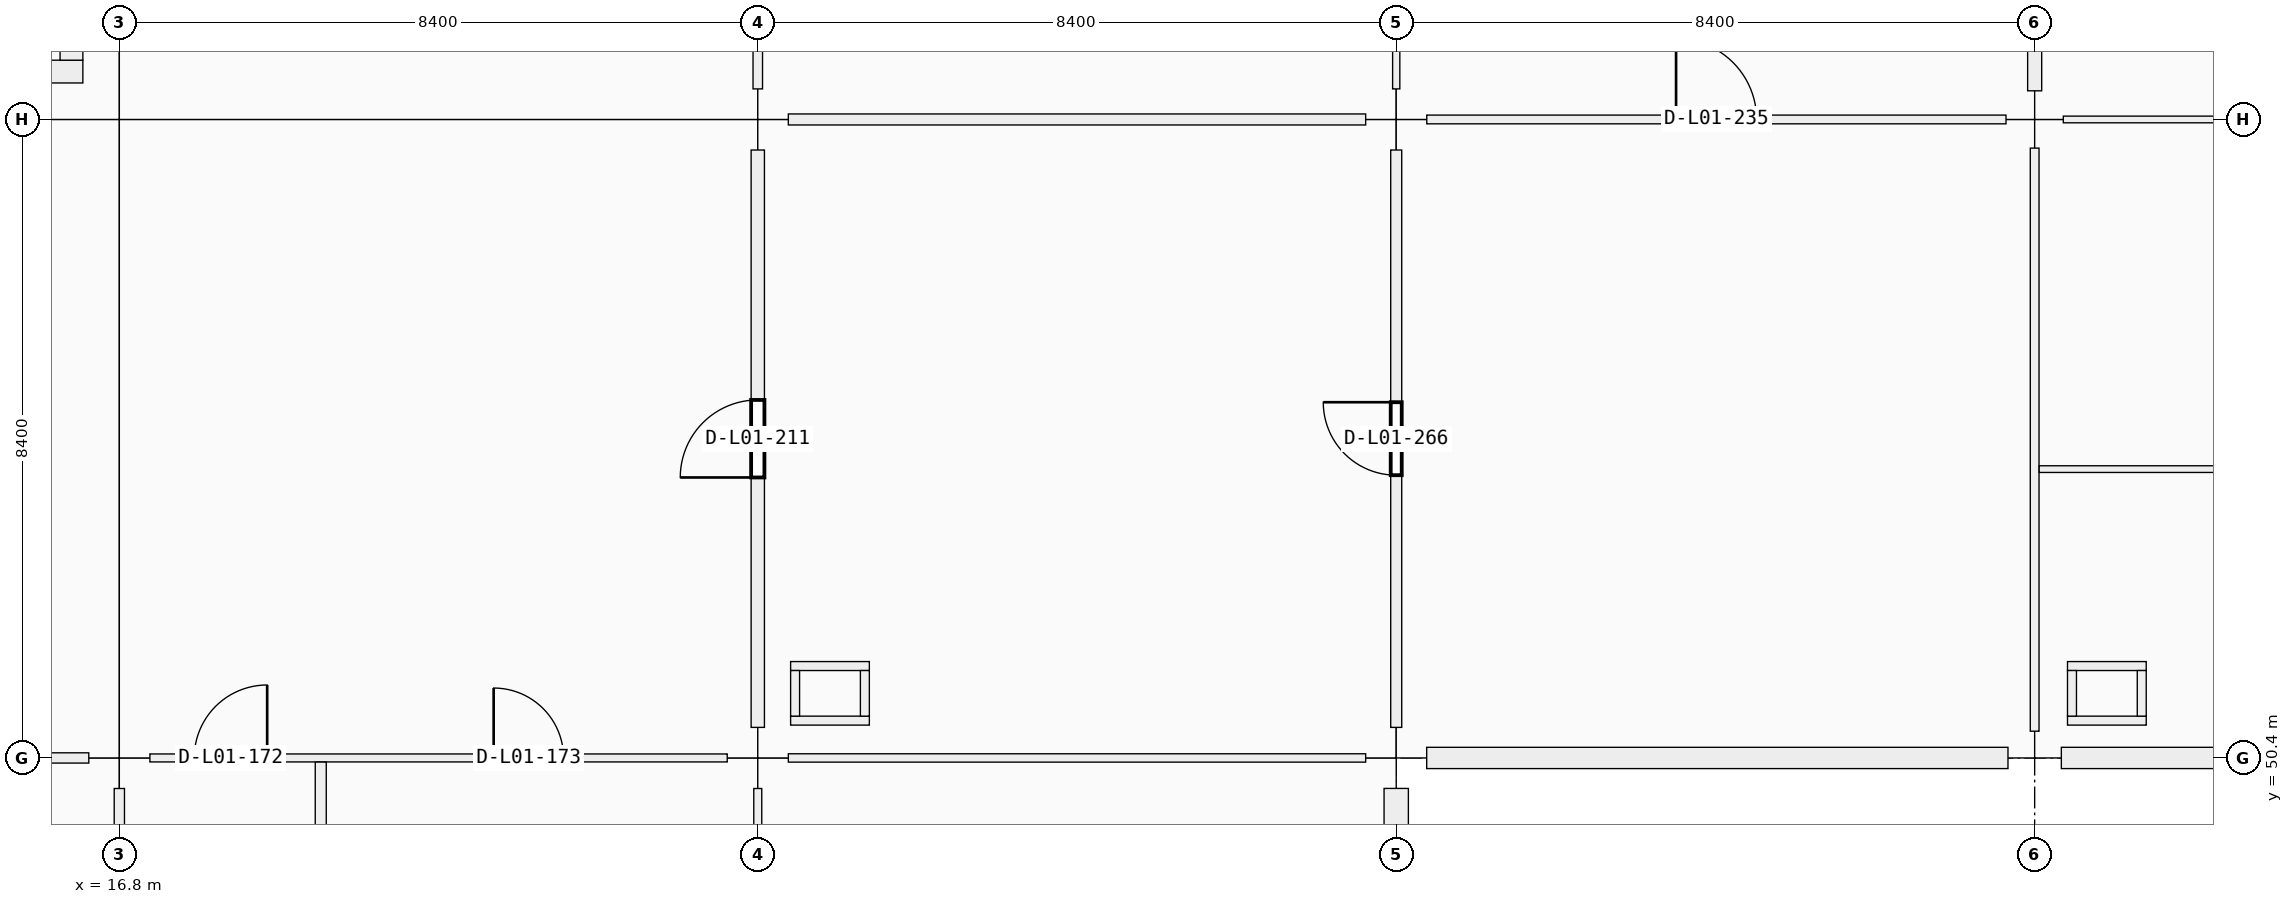
"""IFC4 building model, lengths in metres.
Left out: names, types, materials, properties, quantities, classifications, styles, units other than length and angle.
Written with IfcOpenShell. Run it as: python <this file> out.ifc"""

import sys

from ifc_helpers import new_model, si_unit, direction, frame, frame_2d, origin, origin_2d, place, context, subcontext, project, spatial, rectangle, extrude, element, fill, save


model = new_model("IFC4")
c1 = context("Model", 3, precision=1e-05, world=origin(), true_north=direction((0.0, 1.0)))
c2 = subcontext(c1, "Body", "Model", "MODEL_VIEW")
j1 = project(units=[si_unit("LENGTHUNIT", "METRE"), si_unit("PLANEANGLEUNIT", "RADIAN")], contexts=[c1])
p1 = place(None, origin())
s1 = spatial("IfcSite", under=j1, at=p1, CompositionType="ELEMENT")
p2 = place(p1, origin())
s2 = spatial("IfcBuilding", under=s1, at=p2, CompositionType="ELEMENT")
p3 = place(p2, frame((0.0, 0.0, 5.76)))
s3 = spatial("IfcBuildingStorey", under=s2, at=p3, CompositionType="ELEMENT", Elevation=5.76)
for number, where, z_axis, x_axis in (
    (1, (16.8, 50.4, 0.0), (0.0, 0.0, 1.0), (1.0, 0.0, 0.0)),
    (2, (16.8, 58.8, 0.0), (0.0, 0.0, 1.0), (1.0, 0.0, 0.0)),
    (3, (25.2, 50.4, 0.0), (0.0, 0.0, 1.0), (1.0, 0.0, 0.0)),
    (4, (25.2, 58.8, 0.0), (0.0, 0.0, 1.0), (1.0, 0.0, 0.0)),
    (5, (33.6, 50.4, 0.0), (0.0, 0.0, 1.0), (1.0, 0.0, 0.0)),
    (6, (33.6, 58.8, 0.0), (0.0, 0.0, 1.0), (1.0, 0.0, 0.0)),
):
    element("IfcColumn", number, at=place(p3, frame(where, z_axis=z_axis, x_axis=x_axis)), inside=s3, PredefinedType="COLUMN", context=c2, shape_type="SweptSolid", body=[
        extrude(rectangle(XDim=0.8, YDim=0.8, at=origin_2d()), origin(), (0.0, 0.0, 1.0), 4.5),
    ])
p4 = place(p3, frame((42.0, 50.4, 0.0), z_axis=(0.0, 0.0, 1.0), x_axis=(1.0, 0.0, 0.0)))
e7 = element("IfcColumn", 7, at=p4, inside=s3, PredefinedType="COLUMN", context=c2, shape_type="SweptSolid", body=[
    extrude(rectangle(XDim=0.7, YDim=0.7, at=origin_2d()), origin(), (0.0, 0.0, 1.0), 4.5),
])
p5 = place(p3, frame((42.0, 58.8, 0.0), z_axis=(0.0, 0.0, 1.0), x_axis=(1.0, 0.0, 0.0)))
e8 = element("IfcColumn", 8, at=p5, inside=s3, PredefinedType="COLUMN", context=c2, shape_type="SweptSolid", body=[
    extrude(rectangle(XDim=0.75, YDim=0.75, at=origin_2d()), origin(), (0.0, 0.0, 1.0), 4.5),
])
p6 = place(p3, frame((33.6, 49.999, 0.0), z_axis=(0.0, 0.0, 1.0), x_axis=(0.0, -1.0, 0.0)))
e9 = element("IfcWall", 9, at=p6, inside=s3, PredefinedType="SOLIDWALL", context=c2, shape_type="SweptSolid", body=[
    extrude(rectangle(XDim=7.598, YDim=0.32, at=frame_2d((3.799, 0.0))), origin(), (0.0, 0.0, 1.0), 3.4),
])
p7 = place(p6, frame((2.924, 0.0, 0.9)))
e10 = element("IfcOpeningElement", 10, at=p7, cuts=e9, PredefinedType="OPENING", context=c2, shape_type="SweptSolid", body=[
    extrude(rectangle(XDim=1.75, YDim=1.95, at=frame_2d((0.875, 0.975))), frame((0.0, 0.16, 0.0), z_axis=(0.0, -1.0, 0.0), x_axis=(1.0, 0.0, 0.0)), (0.0, 0.0, 1.0), 0.32),
])
p8 = place(p3, frame((41.649, 50.4, 0.0), z_axis=(0.0, 0.0, 1.0), x_axis=(-1.0, 0.0, 0.0)))
e11 = element("IfcWall", 11, at=p8, inside=s3, PredefinedType="SOLIDWALL", context=c2, shape_type="SweptSolid", body=[
    extrude(rectangle(XDim=7.648, YDim=0.28, at=frame_2d((3.824, 0.0))), origin(), (0.0, 0.0, 1.0), 3.4),
])
p9 = place(p3, frame((50.024, 50.4, 0.0), z_axis=(0.0, 0.0, 1.0), x_axis=(-1.0, 0.0, 0.0)))
e12 = element("IfcWall", 12, at=p9, inside=s3, PredefinedType="SOLIDWALL", context=c2, shape_type="SweptSolid", body=[
    extrude(rectangle(XDim=7.673, YDim=0.28, at=frame_2d((3.836, 0.0))), origin(), (0.0, 0.0, 1.0), 3.4),
])
p10 = place(p9, frame((2.462, 0.0, 0.9)))
e13 = element("IfcOpeningElement", 13, at=p10, cuts=e12, PredefinedType="OPENING", context=c2, shape_type="SweptSolid", body=[
    extrude(rectangle(XDim=2.75, YDim=1.6, at=frame_2d((1.375, 0.8))), frame((0.0, 0.14, 0.0), z_axis=(0.0, -1.0, 0.0), x_axis=(1.0, 0.0, 0.0)), (0.0, 0.0, 1.0), 0.28),
])
p11 = place(p3, frame((16.32, 59.43, 0.0), z_axis=(0.0, 0.0, 1.0), x_axis=(-1.0, 0.0, 0.0)))
e14 = element("IfcWall", 14, at=p11, inside=s3, PredefinedType="SHEAR", context=c2, shape_type="SweptSolid", body=[
    extrude(rectangle(XDim=7.44, YDim=0.3, at=frame_2d((3.72, 0.0))), origin(), (0.0, 0.0, 1.0), 4.5),
])
p12 = place(p11, frame((1.28, 0.0, 0.0)))
e15 = element("IfcOpeningElement", 15, at=p12, cuts=e14, PredefinedType="OPENING", context=c2, shape_type="SweptSolid", body=[
    extrude(rectangle(XDim=1.5, YDim=2.15, at=frame_2d((0.75, 1.075))), frame((0.0, 0.15, 0.0), z_axis=(0.0, -1.0, 0.0), x_axis=(1.0, 0.0, 0.0)), (0.0, 0.0, 1.0), 0.3),
])
p13 = place(p3, frame((16.17, 66.42, 0.0), z_axis=(0.0, 0.0, 1.0), x_axis=(0.0, -1.0, 0.0)))
e16 = element("IfcWall", 16, at=p13, inside=s3, PredefinedType="SHEAR", context=c2, shape_type="SweptSolid", body=[
    extrude(rectangle(XDim=6.84, YDim=0.3, at=frame_2d((3.42, 0.0))), origin(), (0.0, 0.0, 1.0), 4.5),
])
for number, where, z_axis, x_axis in (
    (17, (25.632, 50.891, 0.0), (0.0, 0.0, 1.0), (1.0, 0.0, 0.0)),
    (18, (25.632, 51.609, 0.0), (0.0, 0.0, 1.0), (1.0, 0.0, 0.0)),
):
    element("IfcWall", number, at=place(p3, frame(where, z_axis=z_axis, x_axis=x_axis)), inside=s3, PredefinedType="PARTITIONING", context=c2, shape_type="SweptSolid", body=[
        extrude(rectangle(XDim=1.036, YDim=0.118, at=frame_2d((0.518, 0.0))), origin(), (0.0, 0.0, 1.0), 3.48),
    ])
for number, where, z_axis, x_axis in (
    (19, (25.691, 50.95, 0.0), (0.0, 0.0, 1.0), (0.0, 1.0, 0.0)),
    (20, (26.609, 50.95, 0.0), (0.0, 0.0, 1.0), (0.0, 1.0, 0.0)),
):
    element("IfcWall", number, at=place(p3, frame(where, z_axis=z_axis, x_axis=x_axis)), inside=s3, PredefinedType="PARTITIONING", context=c2, shape_type="SweptSolid", body=[
        extrude(rectangle(XDim=0.6, YDim=0.118, at=frame_2d((0.3, 0.0))), origin(), (0.0, 0.0, 1.0), 3.48),
    ])
for number, where, z_axis, x_axis in (
    (21, (42.432, 50.891, 0.0), (0.0, 0.0, 1.0), (1.0, 0.0, 0.0)),
    (22, (42.432, 51.609, 0.0), (0.0, 0.0, 1.0), (1.0, 0.0, 0.0)),
):
    element("IfcWall", number, at=place(p3, frame(where, z_axis=z_axis, x_axis=x_axis)), inside=s3, PredefinedType="PARTITIONING", context=c2, shape_type="SweptSolid", body=[
        extrude(rectangle(XDim=1.036, YDim=0.118, at=frame_2d((0.518, 0.0))), origin(), (0.0, 0.0, 1.0), 3.48),
    ])
for number, where, z_axis, x_axis in (
    (23, (42.491, 50.95, 0.0), (0.0, 0.0, 1.0), (0.0, 1.0, 0.0)),
    (24, (43.409, 50.95, 0.0), (0.0, 0.0, 1.0), (0.0, 1.0, 0.0)),
):
    element("IfcWall", number, at=place(p3, frame(where, z_axis=z_axis, x_axis=x_axis)), inside=s3, PredefinedType="PARTITIONING", context=c2, shape_type="SweptSolid", body=[
        extrude(rectangle(XDim=0.6, YDim=0.118, at=frame_2d((0.3, 0.0))), origin(), (0.0, 0.0, 1.0), 3.48),
    ])
p14 = place(p3, frame((8.802, 50.4, 0.0), z_axis=(0.0, 0.0, 1.0), x_axis=(1.0, 0.0, 0.0)))
e25 = element("IfcWall", 25, at=p14, inside=s3, PredefinedType="PARTITIONING", context=c2, shape_type="SweptSolid", body=[
    extrude(rectangle(XDim=7.596, YDim=0.135, at=frame_2d((3.798, 0.0))), origin(), (0.0, 0.0, 1.0), 2.4),
])
p15 = place(p14, frame((3.328, 0.0, 0.0)))
e26 = element("IfcOpeningElement", 26, at=p15, cuts=e25, PredefinedType="OPENING", context=c2, shape_type="SweptSolid", body=[
    extrude(rectangle(XDim=0.94, YDim=2.15, at=frame_2d((0.47, 1.075))), frame((0.0, 0.067, 0.0), z_axis=(0.0, -1.0, 0.0), x_axis=(1.0, 0.0, 0.0)), (0.0, 0.0, 1.0), 0.135),
])
p16 = place(p3, frame((17.202, 50.4, 0.0), z_axis=(0.0, 0.0, 1.0), x_axis=(1.0, 0.0, 0.0)))
e27 = element("IfcWall", 27, at=p16, inside=s3, PredefinedType="PARTITIONING", context=c2, shape_type="SweptSolid", body=[
    extrude(rectangle(XDim=7.596, YDim=0.105, at=frame_2d((3.798, 0.0))), origin(), (0.0, 0.0, 1.0), 2.4),
])
p17 = place(p16, frame((0.583, 0.0, 0.0)))
e28 = element("IfcOpeningElement", 28, at=p17, cuts=e27, PredefinedType="OPENING", context=c2, shape_type="SweptSolid", body=[
    extrude(rectangle(XDim=0.96, YDim=2.1, at=frame_2d((0.48, 1.05))), frame((0.0, 0.052, 0.0), z_axis=(0.0, -1.0, 0.0), x_axis=(1.0, 0.0, 0.0)), (0.0, 0.0, 1.0), 0.105),
])
p18 = place(p16, frame((4.523, 0.0, 0.0)))
e29 = element("IfcOpeningElement", 29, at=p18, cuts=e27, PredefinedType="OPENING", context=c2, shape_type="SweptSolid", body=[
    extrude(rectangle(XDim=0.92, YDim=2.1, at=frame_2d((0.46, 1.05))), frame((0.0, 0.052, 0.0), z_axis=(0.0, -1.0, 0.0), x_axis=(1.0, 0.0, 0.0)), (0.0, 0.0, 1.0), 0.105),
])
p19 = place(p3, frame((25.602, 50.4, 0.0), z_axis=(0.0, 0.0, 1.0), x_axis=(1.0, 0.0, 0.0)))
e30 = element("IfcWall", 30, at=p19, inside=s3, PredefinedType="MOVABLE", context=c2, shape_type="SweptSolid", body=[
    extrude(rectangle(XDim=7.596, YDim=0.11, at=frame_2d((3.798, 0.0))), origin(), (0.0, 0.0, 1.0), 2.4),
])
p20 = place(p19, frame((3.258, 0.0, 0.0)))
e31 = element("IfcOpeningElement", 31, at=p20, cuts=e30, PredefinedType="OPENING", context=c2, shape_type="SweptSolid", body=[
    extrude(rectangle(XDim=1.08, YDim=2.22, at=frame_2d((0.54, 1.11))), frame((0.0, 0.055, 0.0), z_axis=(0.0, -1.0, 0.0), x_axis=(1.0, 0.0, 0.0)), (0.0, 0.0, 1.0), 0.11),
])
p21 = place(p3, frame((25.602, 58.8, 0.0), z_axis=(0.0, 0.0, 1.0), x_axis=(1.0, 0.0, 0.0)))
e32 = element("IfcWall", 32, at=p21, inside=s3, PredefinedType="PARTITIONING", context=c2, shape_type="SweptSolid", body=[
    extrude(rectangle(XDim=7.596, YDim=0.145, at=frame_2d((3.798, 0.0))), origin(), (0.0, 0.0, 1.0), 2.4),
])
p22 = place(p21, frame((3.268, 0.0, 0.0)))
e33 = element("IfcOpeningElement", 33, at=p22, cuts=e32, PredefinedType="OPENING", context=c2, shape_type="SweptSolid", body=[
    extrude(rectangle(XDim=1.06, YDim=2.22, at=frame_2d((0.53, 1.11))), frame((0.0, 0.073, 0.0), z_axis=(0.0, -1.0, 0.0), x_axis=(1.0, 0.0, 0.0)), (0.0, 0.0, 1.0), 0.145),
])
p23 = place(p3, frame((34.002, 58.8, 0.0), z_axis=(0.0, 0.0, 1.0), x_axis=(1.0, 0.0, 0.0)))
e34 = element("IfcWall", 34, at=p23, inside=s3, PredefinedType="PARTITIONING", context=c2, shape_type="SweptSolid", body=[
    extrude(rectangle(XDim=7.621, YDim=0.115, at=frame_2d((3.811, 0.0))), origin(), (0.0, 0.0, 1.0), 2.4),
])
p24 = place(p23, frame((3.28, 0.0, 0.0)))
e35 = element("IfcOpeningElement", 35, at=p24, cuts=e34, PredefinedType="OPENING", context=c2, shape_type="SweptSolid", body=[
    extrude(rectangle(XDim=1.06, YDim=2.22, at=frame_2d((0.53, 1.11))), frame((0.0, 0.058, 0.0), z_axis=(0.0, -1.0, 0.0), x_axis=(1.0, 0.0, 0.0)), (0.0, 0.0, 1.0), 0.115),
])
p25 = place(p3, frame((42.377, 58.8, 0.0), z_axis=(0.0, 0.0, 1.0), x_axis=(1.0, 0.0, 0.0)))
e36 = element("IfcWall", 36, at=p25, inside=s3, PredefinedType="PARTITIONING", context=c2, shape_type="SweptSolid", body=[
    extrude(rectangle(XDim=7.671, YDim=0.088, at=frame_2d((3.835, 0.0))), origin(), (0.0, 0.0, 1.0), 2.4),
])
p26 = place(p3, frame((16.8, 42.402, 0.0), z_axis=(0.0, 0.0, 1.0), x_axis=(0.0, 1.0, 0.0)))
e37 = element("IfcWall", 37, at=p26, inside=s3, PredefinedType="PARTITIONING", context=c2, shape_type="SweptSolid", body=[
    extrude(rectangle(XDim=7.596, YDim=0.135, at=frame_2d((3.798, 0.0))), origin(), (0.0, 0.0, 1.0), 2.4),
])
p27 = place(p3, frame((25.2, 42.402, 0.0), z_axis=(0.0, 0.0, 1.0), x_axis=(0.0, 1.0, 0.0)))
e38 = element("IfcWall", 38, at=p27, inside=s3, PredefinedType="PARTITIONING", context=c2, shape_type="SweptSolid", body=[
    extrude(rectangle(XDim=7.596, YDim=0.105, at=frame_2d((3.798, 0.0))), origin(), (0.0, 0.0, 1.0), 2.4),
])
p28 = place(p3, frame((25.2, 50.802, 0.0), z_axis=(0.0, 0.0, 1.0), x_axis=(0.0, 1.0, 0.0)))
e39 = element("IfcWall", 39, at=p28, inside=s3, PredefinedType="PARTITIONING", context=c2, shape_type="SweptSolid", body=[
    extrude(rectangle(XDim=7.596, YDim=0.175, at=frame_2d((3.798, 0.0))), origin(), (0.0, 0.0, 1.0), 2.4),
])
p29 = place(p28, frame((3.288, 0.0, 0.0)))
e40 = element("IfcOpeningElement", 40, at=p29, cuts=e39, PredefinedType="OPENING", context=c2, shape_type="SweptSolid", body=[
    extrude(rectangle(XDim=1.02, YDim=2.2, at=frame_2d((0.51, 1.1))), frame((0.0, 0.087, 0.0), z_axis=(0.0, -1.0, 0.0), x_axis=(1.0, 0.0, 0.0)), (0.0, 0.0, 1.0), 0.175),
])
p30 = place(p3, frame((25.2, 59.202, 0.0), z_axis=(0.0, 0.0, 1.0), x_axis=(0.0, 1.0, 0.0)))
e41 = element("IfcWall", 41, at=p30, inside=s3, PredefinedType="PARTITIONING", context=c2, shape_type="SweptSolid", body=[
    extrude(rectangle(XDim=7.596, YDim=0.125, at=frame_2d((3.798, 0.0))), origin(), (0.0, 0.0, 1.0), 2.4),
])
p31 = place(p30, frame((3.298, 0.0, 0.0)))
e42 = element("IfcOpeningElement", 42, at=p31, cuts=e41, PredefinedType="OPENING", context=c2, shape_type="SweptSolid", body=[
    extrude(rectangle(XDim=1.0, YDim=2.2, at=frame_2d((0.5, 1.1))), frame((0.0, 0.062, 0.0), z_axis=(0.0, -1.0, 0.0), x_axis=(1.0, 0.0, 0.0)), (0.0, 0.0, 1.0), 0.125),
])
p32 = place(p3, frame((33.6, 50.802, 0.0), z_axis=(0.0, 0.0, 1.0), x_axis=(0.0, 1.0, 0.0)))
e43 = element("IfcWall", 43, at=p32, inside=s3, PredefinedType="PARTITIONING", context=c2, shape_type="SweptSolid", body=[
    extrude(rectangle(XDim=7.596, YDim=0.145, at=frame_2d((3.798, 0.0))), origin(), (0.0, 0.0, 1.0), 2.4),
])
p33 = place(p32, frame((3.318, 0.0, 0.0)))
e44 = element("IfcOpeningElement", 44, at=p33, cuts=e43, PredefinedType="OPENING", context=c2, shape_type="SweptSolid", body=[
    extrude(rectangle(XDim=0.96, YDim=2.18, at=frame_2d((0.48, 1.09))), frame((0.0, 0.073, 0.0), z_axis=(0.0, -1.0, 0.0), x_axis=(1.0, 0.0, 0.0)), (0.0, 0.0, 1.0), 0.145),
])
p34 = place(p3, frame((33.6, 59.202, 0.0), z_axis=(0.0, 0.0, 1.0), x_axis=(0.0, 1.0, 0.0)))
e45 = element("IfcWall", 45, at=p34, inside=s3, PredefinedType="PARTITIONING", context=c2, shape_type="SweptSolid", body=[
    extrude(rectangle(XDim=7.596, YDim=0.095, at=frame_2d((3.798, 0.0))), origin(), (0.0, 0.0, 1.0), 2.4),
])
p35 = place(p34, frame((3.308, 0.0, 0.0)))
e46 = element("IfcOpeningElement", 46, at=p35, cuts=e45, PredefinedType="OPENING", context=c2, shape_type="SweptSolid", body=[
    extrude(rectangle(XDim=0.98, YDim=2.18, at=frame_2d((0.49, 1.09))), frame((0.0, 0.047, 0.0), z_axis=(0.0, -1.0, 0.0), x_axis=(1.0, 0.0, 0.0)), (0.0, 0.0, 1.0), 0.095),
])
p36 = place(p3, frame((42.0, 50.752, 0.0), z_axis=(0.0, 0.0, 1.0), x_axis=(0.0, 1.0, 0.0)))
e47 = element("IfcWall", 47, at=p36, inside=s3, PredefinedType="PARTITIONING", context=c2, shape_type="SweptSolid", body=[
    extrude(rectangle(XDim=7.671, YDim=0.115, at=frame_2d((3.835, 0.0))), origin(), (0.0, 0.0, 1.0), 2.4),
])
p37 = place(p3, frame((42.0, 59.177, 0.0), z_axis=(0.0, 0.0, 1.0), x_axis=(0.0, 1.0, 0.0)))
e48 = element("IfcWall", 48, at=p37, inside=s3, PredefinedType="PARTITIONING", context=c2, shape_type="SweptSolid", body=[
    extrude(rectangle(XDim=7.621, YDim=0.185, at=frame_2d((3.811, 0.0))), origin(), (0.0, 0.0, 1.0), 2.4),
])
p38 = place(p3, frame((19.45, 42.08, 0.0), z_axis=(0.0, 0.0, 1.0), x_axis=(0.0, 1.0, 0.0)))
e49 = element("IfcWall", 49, at=p38, inside=s3, PredefinedType="PARTITIONING", context=c2, shape_type="SweptSolid", body=[
    extrude(rectangle(XDim=8.266, YDim=0.145, at=frame_2d((4.133, 0.0))), origin(), (0.0, 0.0, 1.0), 2.4),
])
p39 = place(p3, frame((42.06, 54.2, 0.0), z_axis=(0.0, 0.0, 1.0), x_axis=(1.0, 0.0, 0.0)))
e50 = element("IfcWall", 50, at=p39, inside=s3, PredefinedType="PARTITIONING", context=c2, shape_type="SweptSolid", body=[
    extrude(rectangle(XDim=8.294, YDim=0.088, at=frame_2d((4.147, 0.0))), origin(), (0.0, 0.0, 1.0), 2.4),
])
p40 = place(p17, origin())
e51 = element("IfcDoor", 51, at=p40, inside=s3, OperationType="SINGLE_SWING_RIGHT", PredefinedType="DOOR", context=c2, shape_type="SweptSolid", body=[
    extrude(rectangle(XDim=0.96, YDim=2.1, at=frame_2d((0.48, 1.05))), frame((0.0, 0.025, 0.0), z_axis=(0.0, -1.0, 0.0), x_axis=(1.0, 0.0, 0.0)), (0.0, 0.0, 1.0), 0.05),
])
fill(e28, e51)
p41 = place(p18, origin())
e52 = element("IfcDoor", 52, at=p41, inside=s3, OperationType="SINGLE_SWING_LEFT", PredefinedType="DOOR", context=c2, shape_type="SweptSolid", body=[
    extrude(rectangle(XDim=0.92, YDim=2.1, at=frame_2d((0.46, 1.05))), frame((0.0, 0.025, 0.0), z_axis=(0.0, -1.0, 0.0), x_axis=(1.0, 0.0, 0.0)), (0.0, 0.0, 1.0), 0.05),
])
fill(e29, e52)
p42 = place(p29, origin())
e53 = element("IfcDoor", 53, at=p42, inside=s3, OperationType="SINGLE_SWING_LEFT", PredefinedType="DOOR", context=c2, shape_type="SweptSolid", body=[
    extrude(rectangle(XDim=1.02, YDim=2.2, at=frame_2d((0.51, 1.1))), frame((0.0, 0.025, 0.0), z_axis=(0.0, -1.0, 0.0), x_axis=(1.0, 0.0, 0.0)), (0.0, 0.0, 1.0), 0.05),
])
fill(e40, e53)
p43 = place(p24, origin())
e54 = element("IfcDoor", 54, at=p43, inside=s3, OperationType="SINGLE_SWING_LEFT", PredefinedType="DOOR", context=c2, shape_type="SweptSolid", body=[
    extrude(rectangle(XDim=1.06, YDim=2.22, at=frame_2d((0.53, 1.11))), frame((0.0, 0.025, 0.0), z_axis=(0.0, -1.0, 0.0), x_axis=(1.0, 0.0, 0.0)), (0.0, 0.0, 1.0), 0.05),
])
fill(e35, e54)
p44 = place(p33, origin())
e55 = element("IfcDoor", 55, at=p44, inside=s3, OperationType="SINGLE_SWING_RIGHT", PredefinedType="DOOR", context=c2, shape_type="SweptSolid", body=[
    extrude(rectangle(XDim=0.96, YDim=2.18, at=frame_2d((0.48, 1.09))), frame((0.0, 0.025, 0.0), z_axis=(0.0, -1.0, 0.0), x_axis=(1.0, 0.0, 0.0)), (0.0, 0.0, 1.0), 0.05),
])
fill(e44, e55)
p45 = place(p20, origin())
e56 = element("IfcDoor", 56, at=p45, inside=s3, OperationType="SINGLE_SWING_LEFT", PredefinedType="DOOR", context=c2, shape_type="SweptSolid", body=[
    extrude(rectangle(XDim=1.08, YDim=2.22, at=frame_2d((0.54, 1.11))), frame((0.0, 0.025, 0.0), z_axis=(0.0, -1.0, 0.0), x_axis=(1.0, 0.0, 0.0)), (0.0, 0.0, 1.0), 0.05),
])
fill(e31, e56)
p46 = place(p22, origin())
e57 = element("IfcDoor", 57, at=p46, inside=s3, OperationType="SINGLE_SWING_RIGHT", PredefinedType="DOOR", context=c2, shape_type="SweptSolid", body=[
    extrude(rectangle(XDim=1.06, YDim=2.22, at=frame_2d((0.53, 1.11))), frame((0.0, 0.025, 0.0), z_axis=(0.0, -1.0, 0.0), x_axis=(1.0, 0.0, 0.0)), (0.0, 0.0, 1.0), 0.05),
])
fill(e33, e57)
save(model, sys.argv[1])
